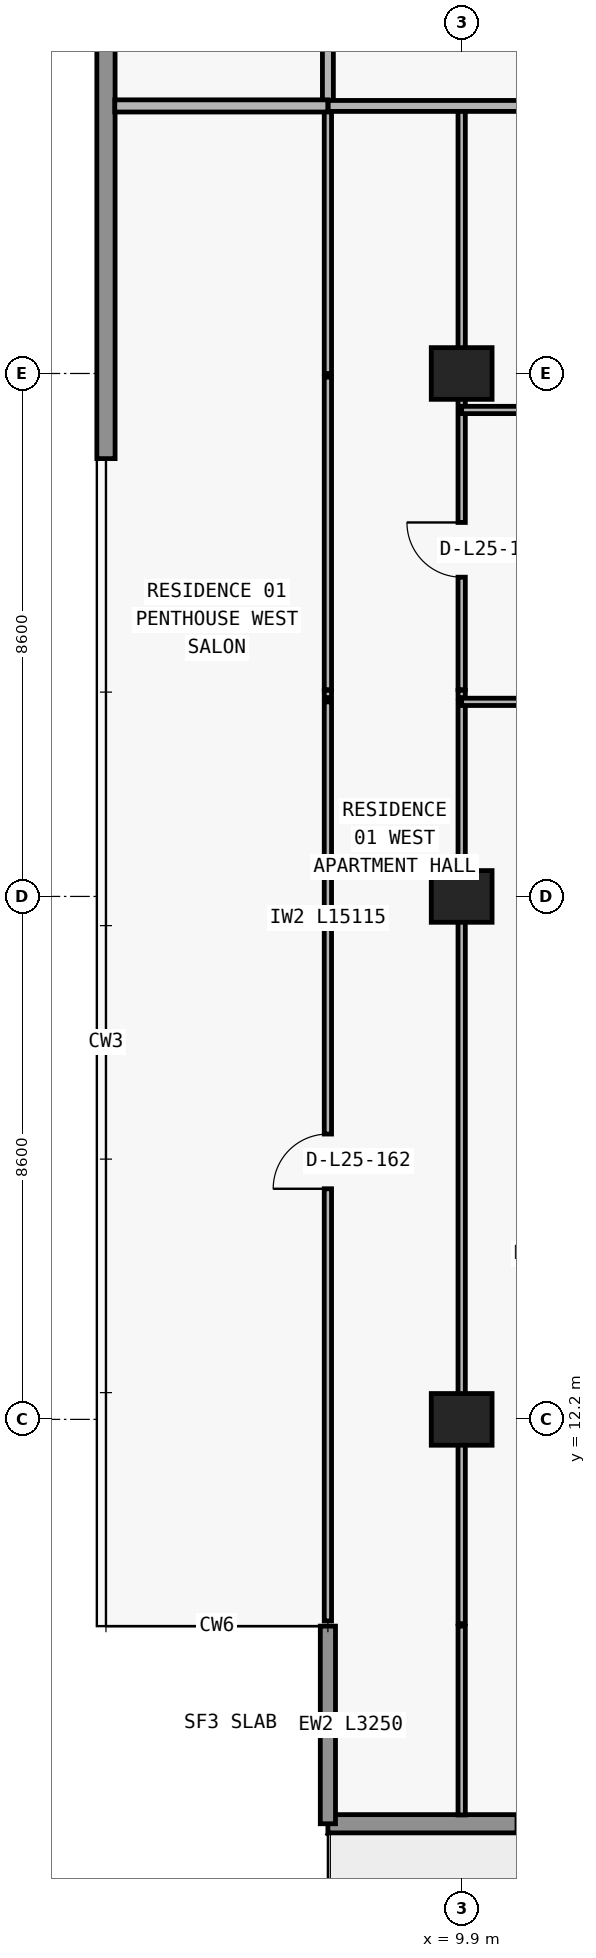
"""IFC4 building model, lengths in metres.
Left out: names, types, materials, properties, quantities, classifications, styles, units other than length and angle.
Written with IfcOpenShell. Run it as: python <this file> out.ifc"""

import sys

from ifc_helpers import new_model, si_unit, direction, frame, frame_2d, origin, origin_2d, place, context, subcontext, project, spatial, rectangle, extrude, element, fill, save


model = new_model("IFC4")
c1 = context("Model", 3, precision=1e-05, world=origin(), true_north=direction((0.0, 1.0)))
c2 = subcontext(c1, "Body", "Model", "MODEL_VIEW")
j1 = project(units=[si_unit("LENGTHUNIT", "METRE"), si_unit("PLANEANGLEUNIT", "RADIAN")], contexts=[c1])
p1 = place(None, origin())
s1 = spatial("IfcSite", under=j1, at=p1, CompositionType="ELEMENT")
p2 = place(p1, origin())
s2 = spatial("IfcBuilding", under=s1, at=p2, CompositionType="ELEMENT")
p3 = place(p2, frame((0.0, 0.0, 94.5)))
s3 = spatial("IfcBuildingStorey", under=s2, at=p3, CompositionType="ELEMENT", Elevation=94.5)
for number, where, z_axis, x_axis in (
    (1, (9.9, 12.2, 0.0), (0.0, 0.0, 1.0), (1.0, 0.0, 0.0)),
    (2, (9.9, 20.8, 0.0), (0.0, 0.0, 1.0), (1.0, 0.0, 0.0)),
    (3, (9.9, 29.4, 0.0), (0.0, 0.0, 1.0), (1.0, 0.0, 0.0)),
):
    element("IfcColumn", number, at=place(p3, frame(where, z_axis=z_axis, x_axis=x_axis)), inside=s3, PredefinedType="COLUMN", context=c2, shape_type="SweptSolid", body=[
        extrude(rectangle(XDim=1.0, YDim=0.85, at=origin_2d()), origin(), (0.0, 0.0, 1.0), 3.0),
    ])
p4 = place(p3, frame((70.1, 5.55, 0.0), z_axis=(0.0, 0.0, 1.0), x_axis=(-1.0, 0.0, 0.0)))
e4 = element("IfcWall", 4, at=p4, inside=s3, PredefinedType="STANDARD", context=c2, shape_type="SweptSolid", body=[
    extrude(rectangle(XDim=62.4, YDim=0.3, at=frame_2d((31.2, 0.0))), origin(), (0.0, 0.0, 1.0), 3.0),
])
p5 = place(p4, frame((57.29, 0.0, 0.0)))
e5 = element("IfcOpeningElement", 5, at=p5, cuts=e4, PredefinedType="OPENING", context=c2, shape_type="SweptSolid", body=[
    extrude(rectangle(XDim=2.0, YDim=2.3, at=frame_2d((1.0, 1.15))), frame((0.0, 0.16, 0.0), z_axis=(0.0, -1.0, 0.0), x_axis=(1.0, 0.0, 0.0)), (0.0, 0.0, 1.0), 0.32),
])
p6 = place(p4, frame((52.61, 0.0, 0.65)))
e6 = element("IfcOpeningElement", 6, at=p6, cuts=e4, PredefinedType="OPENING", context=c2, shape_type="SweptSolid", body=[
    extrude(rectangle(XDim=2.6, YDim=1.85, at=frame_2d((1.3, 0.925))), frame((0.0, 0.16, 0.0), z_axis=(0.0, -1.0, 0.0), x_axis=(1.0, 0.0, 0.0)), (0.0, 0.0, 1.0), 0.32),
])
p7 = place(p4, frame((46.5, 0.0, 0.85)))
e7 = element("IfcOpeningElement", 7, at=p7, cuts=e4, PredefinedType="OPENING", context=c2, shape_type="SweptSolid", body=[
    extrude(rectangle(XDim=2.2, YDim=1.55, at=frame_2d((1.1, 0.775))), frame((0.0, 0.16, 0.0), z_axis=(0.0, -1.0, 0.0), x_axis=(1.0, 0.0, 0.0)), (0.0, 0.0, 1.0), 0.32),
])
p8 = place(p4, frame((40.09, 0.0, 0.0)))
e8 = element("IfcOpeningElement", 8, at=p8, cuts=e4, PredefinedType="OPENING", context=c2, shape_type="SweptSolid", body=[
    extrude(rectangle(XDim=2.0, YDim=2.3, at=frame_2d((1.0, 1.15))), frame((0.0, 0.16, 0.0), z_axis=(0.0, -1.0, 0.0), x_axis=(1.0, 0.0, 0.0)), (0.0, 0.0, 1.0), 0.32),
])
p9 = place(p4, frame((35.99, 0.0, 0.85)))
e9 = element("IfcOpeningElement", 9, at=p9, cuts=e4, PredefinedType="OPENING", context=c2, shape_type="SweptSolid", body=[
    extrude(rectangle(XDim=1.8, YDim=1.55, at=frame_2d((0.9, 0.775))), frame((0.0, 0.16, 0.0), z_axis=(0.0, -1.0, 0.0), x_axis=(1.0, 0.0, 0.0)), (0.0, 0.0, 1.0), 0.32),
])
p10 = place(p4, frame((28.314, 0.0, 0.85)))
e10 = element("IfcOpeningElement", 10, at=p10, cuts=e4, PredefinedType="OPENING", context=c2, shape_type="SweptSolid", body=[
    extrude(rectangle(XDim=2.2, YDim=1.55, at=frame_2d((1.1, 0.775))), frame((0.0, 0.16, 0.0), z_axis=(0.0, -1.0, 0.0), x_axis=(1.0, 0.0, 0.0)), (0.0, 0.0, 1.0), 0.32),
])
p11 = place(p4, frame((24.09, 0.0, 0.0)))
e11 = element("IfcOpeningElement", 11, at=p11, cuts=e4, PredefinedType="OPENING", context=c2, shape_type="SweptSolid", body=[
    extrude(rectangle(XDim=2.0, YDim=2.3, at=frame_2d((1.0, 1.15))), frame((0.0, 0.16, 0.0), z_axis=(0.0, -1.0, 0.0), x_axis=(1.0, 0.0, 0.0)), (0.0, 0.0, 1.0), 0.32),
])
p12 = place(p4, frame((19.99, 0.0, 0.85)))
e12 = element("IfcOpeningElement", 12, at=p12, cuts=e4, PredefinedType="OPENING", context=c2, shape_type="SweptSolid", body=[
    extrude(rectangle(XDim=1.8, YDim=1.55, at=frame_2d((0.9, 0.775))), frame((0.0, 0.16, 0.0), z_axis=(0.0, -1.0, 0.0), x_axis=(1.0, 0.0, 0.0)), (0.0, 0.0, 1.0), 0.32),
])
p13 = place(p4, frame((16.09, 0.0, 0.0)))
e13 = element("IfcOpeningElement", 13, at=p13, cuts=e4, PredefinedType="OPENING", context=c2, shape_type="SweptSolid", body=[
    extrude(rectangle(XDim=2.0, YDim=2.3, at=frame_2d((1.0, 1.15))), frame((0.0, 0.16, 0.0), z_axis=(0.0, -1.0, 0.0), x_axis=(1.0, 0.0, 0.0)), (0.0, 0.0, 1.0), 0.32),
])
p14 = place(p4, frame((11.41, 0.0, 0.65)))
e14 = element("IfcOpeningElement", 14, at=p14, cuts=e4, PredefinedType="OPENING", context=c2, shape_type="SweptSolid", body=[
    extrude(rectangle(XDim=2.6, YDim=1.85, at=frame_2d((1.3, 0.925))), frame((0.0, 0.16, 0.0), z_axis=(0.0, -1.0, 0.0), x_axis=(1.0, 0.0, 0.0)), (0.0, 0.0, 1.0), 0.32),
])
p15 = place(p4, frame((5.3, 0.0, 0.85)))
e15 = element("IfcOpeningElement", 15, at=p15, cuts=e4, PredefinedType="OPENING", context=c2, shape_type="SweptSolid", body=[
    extrude(rectangle(XDim=2.2, YDim=1.55, at=frame_2d((1.1, 0.775))), frame((0.0, 0.16, 0.0), z_axis=(0.0, -1.0, 0.0), x_axis=(1.0, 0.0, 0.0)), (0.0, 0.0, 1.0), 0.32),
])
p16 = place(p3, frame((7.7, 8.8, 0.0), z_axis=(0.0, 0.0, 1.0), x_axis=(0.0, -1.0, 0.0)))
e16 = element("IfcWall", 16, at=p16, inside=s3, PredefinedType="ELEMENTEDWALL", context=c2, shape_type="SweptSolid", body=[
    extrude(rectangle(XDim=3.25, YDim=0.25, at=frame_2d((1.625, 0.0))), origin(), (0.0, 0.0, 1.0), 3.0),
])
p17 = place(p3, frame((4.05, 28.0, 0.0), z_axis=(0.0, 0.0, 1.0), x_axis=(0.0, 1.0, 0.0)))
e17 = element("IfcWall", 17, at=p17, inside=s3, PredefinedType="STANDARD", context=c2, shape_type="SweptSolid", body=[
    extrude(rectangle(XDim=19.2, YDim=0.3, at=frame_2d((9.6, 0.0))), origin(), (0.0, 0.0, 1.0), 3.0),
])
p18 = place(p3, frame((7.7, 8.885, 0.0), z_axis=(0.0, 0.0, 1.0), x_axis=(0.0, 1.0, 0.0)))
e18 = element("IfcWall", 18, at=p18, inside=s3, PredefinedType="PARTITIONING", context=c2, shape_type="SweptSolid", body=[
    extrude(rectangle(XDim=15.115, YDim=0.12, at=frame_2d((7.558, 0.0))), origin(), (0.0, 0.0, 1.0), 3.0),
])
p19 = place(p18, frame((7.107, 0.0, 0.0)))
e19 = element("IfcOpeningElement", 19, at=p19, cuts=e18, PredefinedType="OPENING", context=c2, shape_type="SweptSolid", body=[
    extrude(rectangle(XDim=0.9, YDim=2.15, at=frame_2d((0.45, 1.075))), frame((0.0, 0.07, 0.0), z_axis=(0.0, -1.0, 0.0), x_axis=(1.0, 0.0, 0.0)), (0.0, 0.0, 1.0), 0.14),
])
p20 = place(p3, frame((7.7, 24.07, 0.0), z_axis=(0.0, 0.0, 1.0), x_axis=(0.0, 1.0, 0.0)))
e20 = element("IfcWall", 20, at=p20, inside=s3, PredefinedType="PARTITIONING", context=c2, shape_type="SweptSolid", body=[
    extrude(rectangle(XDim=0.12, YDim=0.12, at=frame_2d((0.06, 0.0))), origin(), (0.0, 0.0, 1.0), 3.0),
])
p21 = place(p3, frame((7.7, 24.2, 0.0), z_axis=(0.0, 0.0, 1.0), x_axis=(0.0, 1.0, 0.0)))
e21 = element("IfcWall", 21, at=p21, inside=s3, PredefinedType="PARTITIONING", context=c2, shape_type="SweptSolid", body=[
    extrude(rectangle(XDim=5.14, YDim=0.12, at=frame_2d((2.57, 0.0))), origin(), (0.0, 0.0, 1.0), 3.0),
])
p22 = place(p3, frame((7.7, 29.4, 0.0), z_axis=(0.0, 0.0, 1.0), x_axis=(0.0, 1.0, 0.0)))
e22 = element("IfcWall", 22, at=p22, inside=s3, PredefinedType="PARTITIONING", context=c2, shape_type="SweptSolid", body=[
    extrude(rectangle(XDim=4.4, YDim=0.12, at=frame_2d((2.2, 0.0))), origin(), (0.0, 0.0, 1.0), 3.0),
])
p23 = place(p3, frame((7.7, 33.805, 0.0), z_axis=(0.0, 0.0, 1.0), x_axis=(0.0, 1.0, 0.0)))
e23 = element("IfcWall", 23, at=p23, inside=s3, PredefinedType="PARTITIONING", context=c2, shape_type="SweptSolid", body=[
    extrude(rectangle(XDim=3.145, YDim=0.18, at=frame_2d((1.573, 0.0))), origin(), (0.0, 0.0, 1.0), 3.0),
])
p24 = place(p3, frame((9.9, 5.695, 0.0), z_axis=(0.0, 0.0, 1.0), x_axis=(0.0, 1.0, 0.0)))
e24 = element("IfcWall", 24, at=p24, inside=s3, PredefinedType="PARTITIONING", context=c2, shape_type="SweptSolid", body=[
    extrude(rectangle(XDim=3.105, YDim=0.12, at=frame_2d((1.552, 0.0))), origin(), (0.0, 0.0, 1.0), 3.0),
])
p25 = place(p3, frame((9.9, 8.84, 0.0), z_axis=(0.0, 0.0, 1.0), x_axis=(0.0, 1.0, 0.0)))
e25 = element("IfcWall", 25, at=p25, inside=s3, PredefinedType="PARTITIONING", context=c2, shape_type="SweptSolid", body=[
    extrude(rectangle(XDim=15.16, YDim=0.12, at=frame_2d((7.58, 0.0))), origin(), (0.0, 0.0, 1.0), 2.124),
])
p26 = place(p3, frame((9.9, 24.07, 0.0), z_axis=(0.0, 0.0, 1.0), x_axis=(0.0, 1.0, 0.0)))
e26 = element("IfcWall", 26, at=p26, inside=s3, PredefinedType="PARTITIONING", context=c2, shape_type="SweptSolid", body=[
    extrude(rectangle(XDim=0.12, YDim=0.12, at=frame_2d((0.06, 0.0))), origin(), (0.0, 0.0, 1.0), 2.124),
])
p27 = place(p3, frame((9.9, 24.2, 0.0), z_axis=(0.0, 0.0, 1.0), x_axis=(0.0, 1.0, 0.0)))
e27 = element("IfcWall", 27, at=p27, inside=s3, PredefinedType="PARTITIONING", context=c2, shape_type="SweptSolid", body=[
    extrude(rectangle(XDim=5.14, YDim=0.12, at=frame_2d((2.57, 0.0))), origin(), (0.0, 0.0, 1.0), 2.124),
])
p28 = place(p27, frame((1.85, 0.0, 0.0)))
e28 = element("IfcOpeningElement", 28, at=p28, cuts=e27, PredefinedType="OPENING", context=c2, shape_type="SweptSolid", body=[
    extrude(rectangle(XDim=0.9, YDim=2.074, at=frame_2d((0.45, 1.037))), frame((0.0, 0.07, 0.0), z_axis=(0.0, -1.0, 0.0), x_axis=(1.0, 0.0, 0.0)), (0.0, 0.0, 1.0), 0.14),
])
p29 = place(p3, frame((9.9, 29.4, 0.0), z_axis=(0.0, 0.0, 1.0), x_axis=(0.0, 1.0, 0.0)))
e29 = element("IfcWall", 29, at=p29, inside=s3, PredefinedType="PARTITIONING", context=c2, shape_type="SweptSolid", body=[
    extrude(rectangle(XDim=4.4, YDim=0.12, at=frame_2d((2.2, 0.0))), origin(), (0.0, 0.0, 1.0), 2.124),
])
p30 = place(p3, frame((9.9, 24.0, 0.0), z_axis=(0.0, 0.0, 1.0), x_axis=(1.0, 0.0, 0.0)))
e30 = element("IfcWall", 30, at=p30, inside=s3, PredefinedType="PARTITIONING", context=c2, shape_type="SweptSolid", body=[
    extrude(rectangle(XDim=8.35, YDim=0.12, at=frame_2d((4.175, 0.0))), origin(), (0.0, 0.0, 1.0), 3.0),
])
p31 = place(p30, frame((1.44, 0.0, 0.0)))
e31 = element("IfcOpeningElement", 31, at=p31, cuts=e30, PredefinedType="OPENING", context=c2, shape_type="SweptSolid", body=[
    extrude(rectangle(XDim=0.9, YDim=2.15, at=frame_2d((0.45, 1.075))), frame((0.0, 0.07, 0.0), z_axis=(0.0, -1.0, 0.0), x_axis=(1.0, 0.0, 0.0)), (0.0, 0.0, 1.0), 0.14),
])
p32 = place(p3, frame((9.9, 28.8, 0.0), z_axis=(0.0, 0.0, 1.0), x_axis=(1.0, 0.0, 0.0)))
e32 = element("IfcWall", 32, at=p32, inside=s3, PredefinedType="PARTITIONING", context=c2, shape_type="SweptSolid", body=[
    extrude(rectangle(XDim=8.35, YDim=0.12, at=frame_2d((4.175, 0.0))), origin(), (0.0, 0.0, 1.0), 3.0),
])
p33 = place(p32, frame((1.44, 0.0, 0.0)))
e33 = element("IfcOpeningElement", 33, at=p33, cuts=e32, PredefinedType="OPENING", context=c2, shape_type="SweptSolid", body=[
    extrude(rectangle(XDim=0.9, YDim=2.15, at=frame_2d((0.45, 1.075))), frame((0.0, 0.07, 0.0), z_axis=(0.0, -1.0, 0.0), x_axis=(1.0, 0.0, 0.0)), (0.0, 0.0, 1.0), 0.14),
])
p34 = place(p3, frame((4.195, 33.8, 0.0), z_axis=(0.0, 0.0, 1.0), x_axis=(1.0, 0.0, 0.0)))
e34 = element("IfcWall", 34, at=p34, inside=s3, PredefinedType="PARTITIONING", context=c2, shape_type="SweptSolid", body=[
    extrude(rectangle(XDim=3.505, YDim=0.2, at=frame_2d((1.752, 0.0))), origin(), (0.0, 0.0, 1.0), 3.0),
])
p35 = place(p3, frame((7.705, 33.8, 0.0), z_axis=(0.0, 0.0, 1.0), x_axis=(1.0, 0.0, 0.0)))
e35 = element("IfcWall", 35, at=p35, inside=s3, PredefinedType="PARTITIONING", context=c2, shape_type="SweptSolid", body=[
    extrude(rectangle(XDim=10.545, YDim=0.18, at=frame_2d((5.272, 0.0))), origin(), (0.0, 0.0, 1.0), 3.0),
])
p36 = place(p35, frame((4.865, 0.0, 0.0)))
e36 = element("IfcOpeningElement", 36, at=p36, cuts=e35, PredefinedType="OPENING", context=c2, shape_type="SweptSolid", body=[
    extrude(rectangle(XDim=1.0, YDim=2.2, at=frame_2d((0.5, 1.1))), frame((0.0, 0.1, 0.0), z_axis=(0.0, -1.0, 0.0), x_axis=(1.0, 0.0, 0.0)), (0.0, 0.0, 1.0), 0.2),
])
p37 = place(p28, origin())
e37 = element("IfcDoor", 37, at=p37, inside=s3, OperationType="SINGLE_SWING_RIGHT", PredefinedType="DOOR", context=c2, shape_type="SweptSolid", body=[
    extrude(rectangle(XDim=0.9, YDim=2.074, at=frame_2d((0.45, 1.037))), frame((0.0, 0.025, 0.0), z_axis=(0.0, -1.0, 0.0), x_axis=(1.0, 0.0, 0.0)), (0.0, 0.0, 1.0), 0.05),
])
fill(e28, e37)
p38 = place(p19, origin())
e38 = element("IfcDoor", 38, at=p38, inside=s3, OperationType="SINGLE_SWING_LEFT", PredefinedType="DOOR", context=c2, shape_type="SweptSolid", body=[
    extrude(rectangle(XDim=0.9, YDim=2.15, at=frame_2d((0.45, 1.075))), frame((0.0, 0.025, 0.0), z_axis=(0.0, -1.0, 0.0), x_axis=(1.0, 0.0, 0.0)), (0.0, 0.0, 1.0), 0.05),
])
fill(e19, e38)
save(model, sys.argv[1])
